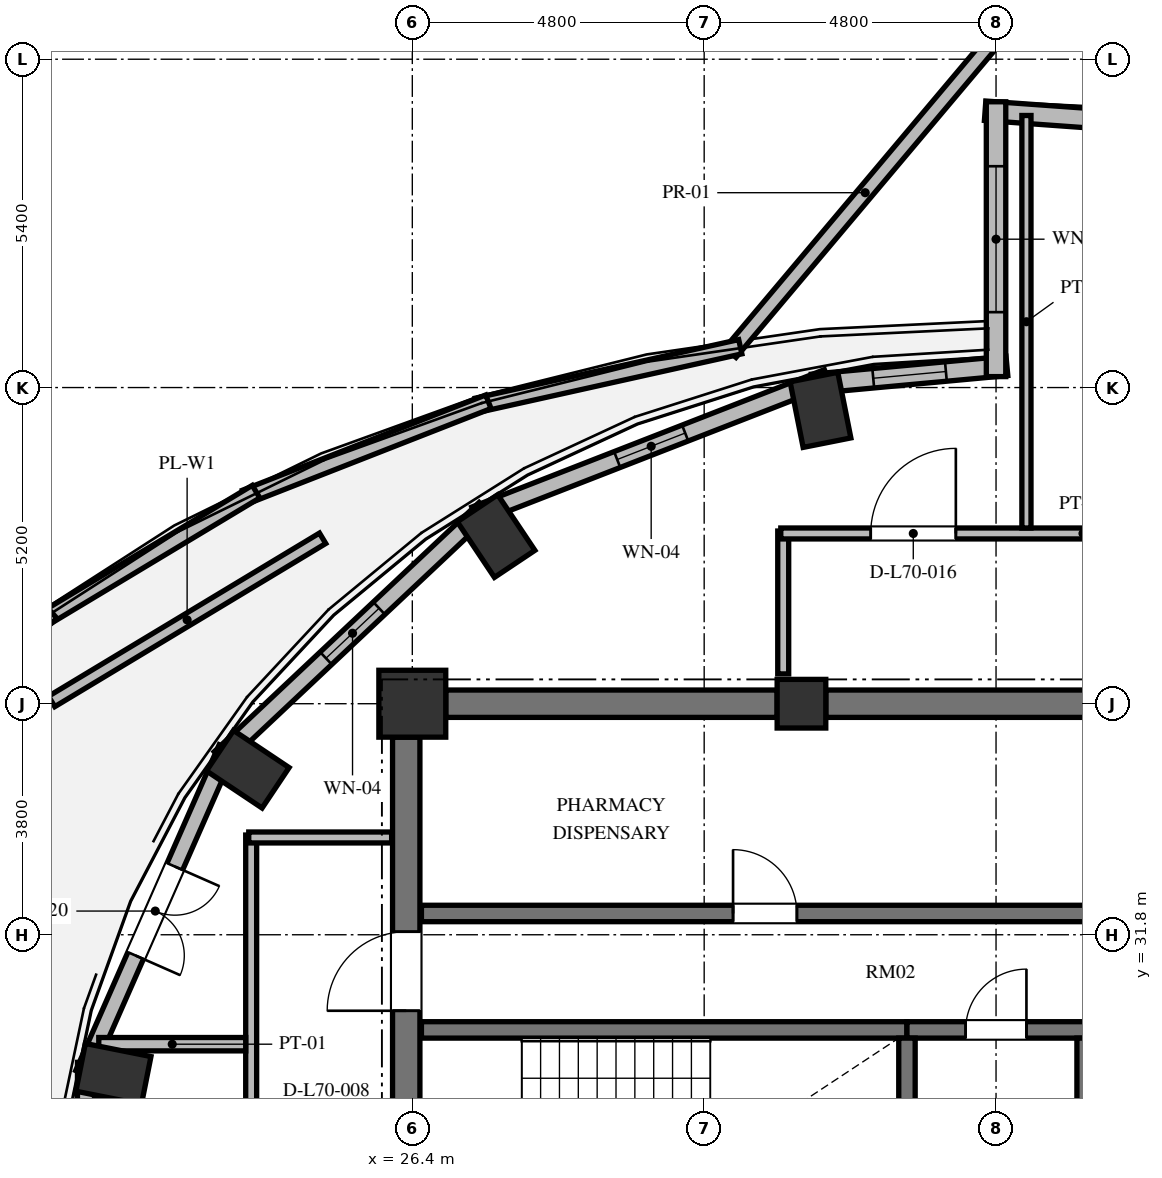
"""IFC4 building model, lengths in metres.
Left out: names, types, materials, properties, quantities, classifications, styles, units other than length and angle.
Written with IfcOpenShell. Run it as: python <this file> out.ifc"""

import sys

from ifc_helpers import new_model, si_unit, direction, frame, frame_2d, origin, origin_2d, place, context, subcontext, project, spatial, rectangle, extrude, element, fill, save


model = new_model("IFC4")
c1 = context("Model", 3, precision=1e-05, world=origin(), true_north=direction((0.0, 1.0)))
c2 = subcontext(c1, "Body", "Model", "MODEL_VIEW")
j1 = project(units=[si_unit("LENGTHUNIT", "METRE"), si_unit("PLANEANGLEUNIT", "RADIAN")], contexts=[c1])
p1 = place(None, origin())
s1 = spatial("IfcSite", under=j1, at=p1, CompositionType="ELEMENT")
p2 = place(p1, origin())
s2 = spatial("IfcBuilding", under=s1, at=p2, CompositionType="ELEMENT")
p3 = place(p2, frame((0.0, 0.0, 269.616)))
s3 = spatial("IfcBuildingStorey", under=s2, at=p3, CompositionType="ELEMENT", Elevation=269.616)
for number, where, z_axis, x_axis in (
    (1, (33.113, 40.433, 0.0), (0.0, 0.0, 1.0), (-0.195, 0.981, 0.0)),
    (2, (27.778, 38.357, 0.0), (0.0, 0.0, 1.0), (-0.556, 0.831, 0.0)),
    (3, (23.694, 34.522, 0.0), (0.0, 0.0, 1.0), (-0.831, 0.556, 0.0)),
    (4, (21.484, 29.512, 0.0), (0.0, 0.0, 1.0), (-0.981, 0.195, 0.0)),
):
    element("IfcColumn", number, at=place(p3, frame(where, z_axis=z_axis, x_axis=x_axis)), inside=s3, PredefinedType="COLUMN", context=c2, shape_type="SweptSolid", body=[
        extrude(rectangle(XDim=1.1, YDim=0.8, at=origin_2d()), origin(), (0.0, 0.0, 1.0), 3.648),
    ])
p4 = place(p3, frame((32.8, 35.6, 0.0), z_axis=(0.0, 0.0, 1.0), x_axis=(1.0, 0.0, 0.0)))
e5 = element("IfcColumn", 5, at=p4, inside=s3, PredefinedType="COLUMN", context=c2, shape_type="SweptSolid", body=[
    extrude(rectangle(XDim=0.8, YDim=0.8, at=origin_2d()), origin(), (0.0, 0.0, 1.0), 3.648),
])
p5 = place(p3, frame((26.4, 35.6, 0.0), z_axis=(0.0, 0.0, 1.0), x_axis=(1.0, 0.0, 0.0)))
e6 = element("IfcColumn", 6, at=p5, inside=s3, PredefinedType="COLUMN", context=c2, shape_type="SweptSolid", body=[
    extrude(rectangle(XDim=1.1, YDim=1.1, at=origin_2d()), origin(), (0.0, 0.0, 1.0), 3.648),
])
p6 = place(p3, frame((26.3, 20.95, 0.0), z_axis=(0.0, 0.0, 1.0), x_axis=(0.0, 1.0, 0.0)))
e7 = element("IfcWall", 7, at=p6, inside=s3, PredefinedType="SHEAR", context=c2, shape_type="SweptSolid", body=[
    extrude(rectangle(XDim=14.1, YDim=0.45, at=frame_2d((7.05, 0.0))), origin(), (0.0, 0.0, 1.0), 3.648),
])
p7 = place(p6, frame((6.5, 0.0, 0.0)))
e8 = element("IfcOpeningElement", 8, at=p7, cuts=e7, PredefinedType="OPENING", context=c2, shape_type="SweptSolid", body=[
    extrude(rectangle(XDim=1.2, YDim=2.15, at=frame_2d((0.6, 1.075))), frame((0.0, 0.235, 0.0), z_axis=(0.0, -1.0, 0.0), x_axis=(1.0, 0.0, 0.0)), (0.0, 0.0, 1.0), 0.47),
])
p8 = place(p6, frame((9.6, 0.0, 0.0)))
e9 = element("IfcOpeningElement", 9, at=p8, cuts=e7, PredefinedType="OPENING", context=c2, shape_type="SweptSolid", body=[
    extrude(rectangle(XDim=1.3, YDim=2.2, at=frame_2d((0.65, 1.1))), frame((0.0, 0.235, 0.0), z_axis=(0.0, -1.0, 0.0), x_axis=(1.0, 0.0, 0.0)), (0.0, 0.0, 1.0), 0.47),
])
p9 = place(p6, frame((3.26, 0.0, 0.0)))
e10 = element("IfcOpeningElement", 10, at=p9, cuts=e7, PredefinedType="OPENING", context=c2, shape_type="SweptSolid", body=[
    extrude(rectangle(XDim=1.3, YDim=2.2, at=frame_2d((0.65, 1.1))), frame((0.0, 0.235, 0.0), z_axis=(0.0, -1.0, 0.0), x_axis=(1.0, 0.0, 0.0)), (0.0, 0.0, 1.0), 0.47),
])
p10 = place(p3, frame((26.95, 35.6, 0.0), z_axis=(0.0, 0.0, 1.0), x_axis=(1.0, 0.0, 0.0)))
e11 = element("IfcWall", 11, at=p10, inside=s3, PredefinedType="SHEAR", context=c2, shape_type="SweptSolid", body=[
    extrude(rectangle(XDim=5.45, YDim=0.45, at=frame_2d((2.725, 0.0))), origin(), (0.0, 0.0, 1.0), 3.648),
])
p11 = place(p3, frame((33.2, 35.6, 0.0), z_axis=(0.0, 0.0, 1.0), x_axis=(1.0, 0.0, 0.0)))
e12 = element("IfcWall", 12, at=p11, inside=s3, PredefinedType="SHEAR", context=c2, shape_type="SweptSolid", body=[
    extrude(rectangle(XDim=5.6, YDim=0.45, at=frame_2d((2.8, 0.0))), origin(), (0.0, 0.0, 1.0), 3.648),
])
p12 = place(p3, frame((33.228, 40.964, 0.0), z_axis=(0.0, 0.0, 1.0), x_axis=(-0.931716550814, -0.36318627306, 0.0)))
e13 = element("IfcWall", 13, at=p12, inside=s3, PredefinedType="SOLIDWALL", context=c2, shape_type="SweptSolid", body=[
    extrude(rectangle(XDim=6.224, YDim=0.28, at=frame_2d((3.112, 0.0))), origin(), (0.0, 0.0, 1.0), 3.448),
])
p13 = place(p12, frame((2.512, 0.0, 0.85)))
e14 = element("IfcOpeningElement", 14, at=p13, cuts=e13, PredefinedType="OPENING", context=c2, shape_type="SweptSolid", body=[
    extrude(rectangle(XDim=1.2, YDim=1.8, at=frame_2d((0.6, 0.9))), frame((0.0, 0.15, 0.0), z_axis=(0.0, -1.0, 0.0), x_axis=(1.0, 0.0, 0.0)), (0.0, 0.0, 1.0), 0.3),
])
p14 = place(p3, frame((27.595, 38.808, 0.0), z_axis=(0.0, 0.0, 1.0), x_axis=(-0.728251519923, -0.685309947199, 0.0)))
e15 = element("IfcWall", 15, at=p14, inside=s3, PredefinedType="SOLIDWALL", context=c2, shape_type="SweptSolid", body=[
    extrude(rectangle(XDim=5.981, YDim=0.28, at=frame_2d((2.99, 0.0))), origin(), (0.0, 0.0, 1.0), 3.448),
])
p15 = place(p14, frame((2.391, 0.0, 0.85)))
e16 = element("IfcOpeningElement", 16, at=p15, cuts=e15, PredefinedType="OPENING", context=c2, shape_type="SweptSolid", body=[
    extrude(rectangle(XDim=1.2, YDim=1.8, at=frame_2d((0.6, 0.9))), frame((0.0, 0.15, 0.0), z_axis=(0.0, -1.0, 0.0), x_axis=(1.0, 0.0, 0.0)), (0.0, 0.0, 1.0), 0.3),
])
p16 = place(p3, frame((23.352, 34.869, 0.0), z_axis=(0.0, 0.0, 1.0), x_axis=(-0.402882523888, -0.915251698685, 0.0)))
e17 = element("IfcWall", 17, at=p16, inside=s3, PredefinedType="SOLIDWALL", context=c2, shape_type="SweptSolid", body=[
    extrude(rectangle(XDim=5.856, YDim=0.28, at=frame_2d((2.928, 0.0))), origin(), (0.0, 0.0, 1.0), 3.448),
])
p17 = place(p16, frame((2.128, 0.0, 0.0)))
e18 = element("IfcOpeningElement", 18, at=p17, cuts=e17, PredefinedType="OPENING", context=c2, shape_type="SweptSolid", body=[
    extrude(rectangle(XDim=1.6, YDim=2.3, at=frame_2d((0.8, 1.15))), frame((0.0, 0.15, 0.0), z_axis=(0.0, -1.0, 0.0), x_axis=(1.0, 0.0, 0.0)), (0.0, 0.0, 1.0), 0.3),
])
p18 = place(p3, frame((21.033, 29.701, 0.0), z_axis=(0.0, 0.0, 1.0), x_axis=(0.0, -1.0, 0.0)))
e19 = element("IfcWall", 19, at=p18, inside=s3, PredefinedType="SOLIDWALL", context=c2, shape_type="SweptSolid", body=[
    extrude(rectangle(XDim=5.803, YDim=0.28, at=frame_2d((2.901, 0.0))), origin(), (0.0, 0.0, 1.0), 3.448),
])
p19 = place(p18, frame((2.187, 0.0, 0.85)))
e20 = element("IfcOpeningElement", 20, at=p19, cuts=e19, PredefinedType="OPENING", context=c2, shape_type="SweptSolid", body=[
    extrude(rectangle(XDim=1.2, YDim=1.8, at=frame_2d((0.6, 0.9))), frame((0.0, 0.15, 0.0), z_axis=(0.0, -1.0, 0.0), x_axis=(1.0, 0.0, 0.0)), (0.0, 0.0, 1.0), 0.3),
])
p20 = place(p3, frame((40.35, 45.026, 0.0), z_axis=(0.0, 0.0, 1.0), x_axis=(-0.997412917451, 0.071885131294, 0.0)))
e21 = element("IfcWall", 21, at=p20, inside=s3, PredefinedType="SOLIDWALL", context=c2, shape_type="SweptSolid", body=[
    extrude(rectangle(XDim=4.541, YDim=0.32, at=frame_2d((2.271, 0.0))), origin(), (0.0, 0.0, 1.0), 3.448),
])
p21 = place(p20, frame((1.67, 0.0, 0.85)))
e22 = element("IfcOpeningElement", 22, at=p21, cuts=e21, PredefinedType="OPENING", context=c2, shape_type="SweptSolid", body=[
    extrude(rectangle(XDim=1.2, YDim=2.2, at=frame_2d((0.6, 1.1))), frame((0.0, 0.17, 0.0), z_axis=(0.0, -1.0, 0.0), x_axis=(1.0, 0.0, 0.0)), (0.0, 0.0, 1.0), 0.34),
])
p22 = place(p3, frame((36.179, 41.156, 0.0), z_axis=(0.0, 0.0, 1.0), x_axis=(-0.995736155144, -0.092247001792, 0.0)))
e23 = element("IfcWall", 23, at=p22, inside=s3, PredefinedType="SOLIDWALL", context=c2, shape_type="SweptSolid", body=[
    extrude(rectangle(XDim=3.216, YDim=0.32, at=frame_2d((1.608, 0.0))), origin(), (0.0, 0.0, 1.0), 3.448),
])
p23 = place(p22, frame((1.008, 0.0, 0.85)))
e24 = element("IfcOpeningElement", 24, at=p23, cuts=e23, PredefinedType="OPENING", context=c2, shape_type="SweptSolid", body=[
    extrude(rectangle(XDim=1.2, YDim=1.8, at=frame_2d((0.6, 0.9))), frame((0.0, 0.17, 0.0), z_axis=(0.0, -1.0, 0.0), x_axis=(1.0, 0.0, 0.0)), (0.0, 0.0, 1.0), 0.34),
])
p24 = place(p3, frame((36.0, 45.5, 0.0), z_axis=(0.0, 0.0, 1.0), x_axis=(0.0, -1.0, 0.0)))
e25 = element("IfcWall", 25, at=p24, inside=s3, PredefinedType="SOLIDWALL", context=c2, shape_type="SweptSolid", body=[
    extrude(rectangle(XDim=4.52, YDim=0.32, at=frame_2d((2.26, 0.0))), origin(), (0.0, 0.0, 1.0), 3.448),
])
p25 = place(p24, frame((1.06, 0.0, 0.84)))
e26 = element("IfcOpeningElement", 26, at=p25, cuts=e25, PredefinedType="OPENING", context=c2, shape_type="SweptSolid", body=[
    extrude(rectangle(XDim=2.4, YDim=2.04, at=frame_2d((1.2, 1.02))), frame((0.0, 0.17, 0.0), z_axis=(0.0, -1.0, 0.0), x_axis=(1.0, 0.0, 0.0)), (0.0, 0.0, 1.0), 0.34),
])
p26 = place(p3, frame((36.064, 46.636, 0.0), z_axis=(0.0, 0.0, 1.0), x_axis=(-0.644157596473, -0.764892797002, 0.0)))
e27 = element("IfcWall", 27, at=p26, inside=s3, PredefinedType="PARAPET", context=c2, shape_type="SweptSolid", body=[
    extrude(rectangle(XDim=6.881, YDim=0.24, at=frame_2d((3.441, 0.0))), origin(), (0.0, 0.0, 1.0), 1.2),
])
p27 = place(p3, frame((31.794, 41.471, 0.0), z_axis=(0.0, 0.0, 1.0), x_axis=(-0.97619223607, -0.216907165018, 0.0)))
e28 = element("IfcWall", 28, at=p27, inside=s3, PredefinedType="PARAPET", context=c2, shape_type="SweptSolid", body=[
    extrude(rectangle(XDim=4.439, YDim=0.24, at=frame_2d((2.22, 0.0))), origin(), (0.0, 0.0, 1.0), 1.2),
])
p28 = place(p3, frame((27.651, 40.566, 0.0), z_axis=(0.0, 0.0, 1.0), x_axis=(-0.931156390878, -0.364620042958, 0.0)))
e29 = element("IfcWall", 29, at=p28, inside=s3, PredefinedType="PARAPET", context=c2, shape_type="SweptSolid", body=[
    extrude(rectangle(XDim=4.296, YDim=0.24, at=frame_2d((2.148, 0.0))), origin(), (0.0, 0.0, 1.0), 1.2),
])
p29 = place(p3, frame((23.83, 39.088, 0.0), z_axis=(0.0, 0.0, 1.0), x_axis=(-0.857072360175, -0.515196049503, 0.0)))
e30 = element("IfcWall", 30, at=p29, inside=s3, PredefinedType="PARAPET", context=c2, shape_type="SweptSolid", body=[
    extrude(rectangle(XDim=4.101, YDim=0.24, at=frame_2d((2.05, 0.0))), origin(), (0.0, 0.0, 1.0), 1.2),
])
p30 = place(p3, frame((20.476, 37.094, 0.0), z_axis=(0.0, 0.0, 1.0), x_axis=(-0.746018095031, -0.665925672944, 0.0)))
e31 = element("IfcWall", 31, at=p30, inside=s3, PredefinedType="PARAPET", context=c2, shape_type="SweptSolid", body=[
    extrude(rectangle(XDim=3.877, YDim=0.24, at=frame_2d((1.939, 0.0))), origin(), (0.0, 0.0, 1.0), 1.2),
])
p31 = place(p3, frame((24.925, 38.321, 0.0), z_axis=(0.0, 0.0, 1.0), x_axis=(-0.856651190981, -0.515896052506, 0.0)))
e32 = element("IfcWall", 32, at=p31, inside=s3, PredefinedType="PARAPET", context=c2, shape_type="SweptSolid", body=[
    extrude(rectangle(XDim=5.202, YDim=0.2, at=frame_2d((2.601, 0.0))), origin(), (0.0, 0.0, 1.0), 0.55),
])
p32 = place(p3, frame((26.55, 30.235, 0.0), z_axis=(0.0, 0.0, 1.0), x_axis=(1.0, 0.0, 0.0)))
e33 = element("IfcWall", 33, at=p32, inside=s3, PredefinedType="SHEAR", context=c2, shape_type="SweptSolid", body=[
    extrude(rectangle(XDim=7.985, YDim=0.27, at=frame_2d((3.992, 0.0))), origin(), (0.0, 0.0, 1.0), 3.648),
])
p33 = place(p3, frame((34.535, 30.235, 0.0), z_axis=(0.0, 0.0, 1.0), x_axis=(1.0, 0.0, 0.0)))
e34 = element("IfcWall", 34, at=p33, inside=s3, PredefinedType="SHEAR", context=c2, shape_type="SweptSolid", body=[
    extrude(rectangle(XDim=2.93, YDim=0.27, at=frame_2d((1.465, 0.0))), origin(), (0.0, 0.0, 1.0), 3.648),
])
p34 = place(p33, frame((0.965, 0.0, 0.0)))
e35 = element("IfcOpeningElement", 35, at=p34, cuts=e34, PredefinedType="OPENING", context=c2, shape_type="SweptSolid", body=[
    extrude(rectangle(XDim=1.0, YDim=2.1, at=frame_2d((0.5, 1.05))), frame((0.0, 0.145, 0.0), z_axis=(0.0, -1.0, 0.0), x_axis=(1.0, 0.0, 0.0)), (0.0, 0.0, 1.0), 0.29),
])
for number, where, z_axis, x_axis in (
    (36, (34.535, 26.02, 0.0), (0.0, 0.0, 1.0), (0.0, 1.0, 0.0)),
    (37, (37.465, 26.02, 0.0), (0.0, 0.0, 1.0), (0.0, 1.0, 0.0)),
):
    element("IfcWall", number, at=place(p3, frame(where, z_axis=z_axis, x_axis=x_axis)), inside=s3, PredefinedType="SHEAR", context=c2, shape_type="SweptSolid", body=[
        extrude(rectangle(XDim=4.08, YDim=0.27, at=frame_2d((2.04, 0.0))), origin(), (0.0, 0.0, 1.0), 3.648),
    ])
p35 = place(p3, frame((26.55, 32.15, 0.0), z_axis=(0.0, 0.0, 1.0), x_axis=(1.0, 0.0, 0.0)))
e38 = element("IfcWall", 38, at=p35, inside=s3, PredefinedType="SHEAR", context=c2, shape_type="SweptSolid", body=[
    extrude(rectangle(XDim=16.4, YDim=0.27, at=frame_2d((8.2, 0.0))), origin(), (0.0, 0.0, 1.0), 3.648),
])
p36 = place(p35, frame((5.125, 0.0, 0.0)))
e39 = element("IfcOpeningElement", 39, at=p36, cuts=e38, PredefinedType="OPENING", context=c2, shape_type="SweptSolid", body=[
    extrude(rectangle(XDim=1.05, YDim=2.15, at=frame_2d((0.525, 1.075))), frame((0.0, 0.145, 0.0), z_axis=(0.0, -1.0, 0.0), x_axis=(1.0, 0.0, 0.0)), (0.0, 0.0, 1.0), 0.29),
])
p37 = place(p35, frame((11.9, 0.0, 0.0)))
e40 = element("IfcOpeningElement", 40, at=p37, cuts=e38, PredefinedType="OPENING", context=c2, shape_type="SweptSolid", body=[
    extrude(rectangle(XDim=1.1, YDim=2.2, at=frame_2d((0.55, 1.1))), frame((0.0, 0.145, 0.0), z_axis=(0.0, -1.0, 0.0), x_axis=(1.0, 0.0, 0.0)), (0.0, 0.0, 1.0), 0.29),
])
p38 = place(p35, frame((14.5, 0.0, 0.0)))
e41 = element("IfcOpeningElement", 41, at=p38, cuts=e38, PredefinedType="OPENING", context=c2, shape_type="SweptSolid", body=[
    extrude(rectangle(XDim=1.1, YDim=2.2, at=frame_2d((0.55, 1.1))), frame((0.0, 0.145, 0.0), z_axis=(0.0, -1.0, 0.0), x_axis=(1.0, 0.0, 0.0)), (0.0, 0.0, 1.0), 0.29),
])
p39 = place(p3, frame((32.5, 36.09, 0.0), z_axis=(0.0, 0.0, 1.0), x_axis=(0.0, 1.0, 0.0)))
e42 = element("IfcWall", 42, at=p39, inside=s3, PredefinedType="PARTITIONING", context=c2, shape_type="SweptSolid", body=[
    extrude(rectangle(XDim=2.35, YDim=0.18, at=frame_2d((1.175, 0.0))), origin(), (0.0, 0.0, 1.0), 3.448),
])
p40 = place(p3, frame((32.46, 38.4, 0.0), z_axis=(0.0, 0.0, 1.0), x_axis=(1.0, 0.0, 0.0)))
e43 = element("IfcWall", 43, at=p40, inside=s3, PredefinedType="PARTITIONING", context=c2, shape_type="SweptSolid", body=[
    extrude(rectangle(XDim=19.879, YDim=0.18, at=frame_2d((9.939, 0.0))), origin(), (0.0, 0.0, 1.0), 3.073),
])
p41 = place(p40, frame((16.101, 0.0, 0.0)))
e44 = element("IfcOpeningElement", 44, at=p41, cuts=e43, PredefinedType="OPENING", context=c2, shape_type="SweptSolid", body=[
    extrude(rectangle(XDim=1.4, YDim=2.2, at=frame_2d((0.7, 1.1))), frame((0.0, 0.1, 0.0), z_axis=(0.0, -1.0, 0.0), x_axis=(1.0, 0.0, 0.0)), (0.0, 0.0, 1.0), 0.2),
])
p42 = place(p40, frame((10.84, 0.0, 0.0)))
e45 = element("IfcOpeningElement", 45, at=p42, cuts=e43, PredefinedType="OPENING", context=c2, shape_type="SweptSolid", body=[
    extrude(rectangle(XDim=1.4, YDim=2.2, at=frame_2d((0.7, 1.1))), frame((0.0, 0.1, 0.0), z_axis=(0.0, -1.0, 0.0), x_axis=(1.0, 0.0, 0.0)), (0.0, 0.0, 1.0), 0.2),
])
p43 = place(p40, frame((5.84, 0.0, 0.0)))
e46 = element("IfcOpeningElement", 46, at=p43, cuts=e43, PredefinedType="OPENING", context=c2, shape_type="SweptSolid", body=[
    extrude(rectangle(XDim=1.4, YDim=2.2, at=frame_2d((0.7, 1.1))), frame((0.0, 0.1, 0.0), z_axis=(0.0, -1.0, 0.0), x_axis=(1.0, 0.0, 0.0)), (0.0, 0.0, 1.0), 0.2),
])
p44 = place(p40, frame((1.479, 0.0, 0.0)))
e47 = element("IfcOpeningElement", 47, at=p44, cuts=e43, PredefinedType="OPENING", context=c2, shape_type="SweptSolid", body=[
    extrude(rectangle(XDim=1.4, YDim=2.2, at=frame_2d((0.7, 1.1))), frame((0.0, 0.1, 0.0), z_axis=(0.0, -1.0, 0.0), x_axis=(1.0, 0.0, 0.0)), (0.0, 0.0, 1.0), 0.2),
])
p45 = place(p3, frame((23.75, 22.16, 0.0), z_axis=(0.0, 0.0, 1.0), x_axis=(0.0, 1.0, 0.0)))
e48 = element("IfcWall", 48, at=p45, inside=s3, PredefinedType="PARTITIONING", context=c2, shape_type="SweptSolid", body=[
    extrude(rectangle(XDim=11.28, YDim=0.18, at=frame_2d((5.64, 0.0))), origin(), (0.0, 0.0, 1.0), 3.448),
])
p46 = place(p45, frame((5.123, 0.0, 0.0)))
e49 = element("IfcOpeningElement", 49, at=p46, cuts=e48, PredefinedType="OPENING", context=c2, shape_type="SweptSolid", body=[
    extrude(rectangle(XDim=1.4, YDim=2.2, at=frame_2d((0.7, 1.1))), frame((0.0, 0.1, 0.0), z_axis=(0.0, -1.0, 0.0), x_axis=(1.0, 0.0, 0.0)), (0.0, 0.0, 1.0), 0.2),
])
p47 = place(p45, frame((1.379, 0.0, 0.0)))
e50 = element("IfcOpeningElement", 50, at=p47, cuts=e48, PredefinedType="OPENING", context=c2, shape_type="SweptSolid", body=[
    extrude(rectangle(XDim=1.4, YDim=2.2, at=frame_2d((0.7, 1.1))), frame((0.0, 0.1, 0.0), z_axis=(0.0, -1.0, 0.0), x_axis=(1.0, 0.0, 0.0)), (0.0, 0.0, 1.0), 0.2),
])
p48 = place(p3, frame((23.71, 33.4, 0.0), z_axis=(0.0, 0.0, 1.0), x_axis=(1.0, 0.0, 0.0)))
e51 = element("IfcWall", 51, at=p48, inside=s3, PredefinedType="PARTITIONING", context=c2, shape_type="SweptSolid", body=[
    extrude(rectangle(XDim=2.35, YDim=0.18, at=frame_2d((1.175, 0.0))), origin(), (0.0, 0.0, 1.0), 3.448),
])
p49 = place(p3, frame((21.244, 30.0, 0.0), z_axis=(0.0, 0.0, 1.0), x_axis=(1.0, 0.0, 0.0)))
e52 = element("IfcWall", 52, at=p49, inside=s3, PredefinedType="PARTITIONING", context=c2, shape_type="SweptSolid", body=[
    extrude(rectangle(XDim=2.416, YDim=0.22, at=frame_2d((1.208, 0.0))), origin(), (0.0, 0.0, 1.0), 3.448),
])
p50 = place(p3, frame((36.5, 38.49, 0.0), z_axis=(0.0, 0.0, 1.0), x_axis=(0.0, 1.0, 0.0)))
e53 = element("IfcWall", 53, at=p50, inside=s3, PredefinedType="PARTITIONING", context=c2, shape_type="SweptSolid", body=[
    extrude(rectangle(XDim=6.785, YDim=0.15, at=frame_2d((3.392, 0.0))), origin(), (0.0, 0.0, 1.0), 3.448),
])
p51 = place(p13, origin())
e54 = element("IfcWindow", 54, at=p51, inside=s3, PartitioningType="SINGLE_PANEL", PredefinedType="WINDOW", context=c2, shape_type="SweptSolid", body=[
    extrude(rectangle(XDim=1.2, YDim=1.8, at=frame_2d((0.6, 0.9))), frame((0.0, 0.03, 0.0), z_axis=(0.0, -1.0, 0.0), x_axis=(1.0, 0.0, 0.0)), (0.0, 0.0, 1.0), 0.06),
])
fill(e14, e54)
p52 = place(p15, origin())
e55 = element("IfcWindow", 55, at=p52, inside=s3, PartitioningType="SINGLE_PANEL", PredefinedType="WINDOW", context=c2, shape_type="SweptSolid", body=[
    extrude(rectangle(XDim=1.2, YDim=1.8, at=frame_2d((0.6, 0.9))), frame((0.0, 0.03, 0.0), z_axis=(0.0, -1.0, 0.0), x_axis=(1.0, 0.0, 0.0)), (0.0, 0.0, 1.0), 0.06),
])
fill(e16, e55)
p53 = place(p17, origin())
e56 = element("IfcDoor", 56, at=p53, inside=s3, OperationType="DOUBLE_DOOR_SINGLE_SWING", PredefinedType="DOOR", context=c2, shape_type="SweptSolid", body=[
    extrude(rectangle(XDim=1.6, YDim=2.3, at=frame_2d((0.8, 1.15))), frame((0.0, 0.025, 0.0), z_axis=(0.0, -1.0, 0.0), x_axis=(1.0, 0.0, 0.0)), (0.0, 0.0, 1.0), 0.05),
])
fill(e18, e56)
p54 = place(p23, origin())
e57 = element("IfcWindow", 57, at=p54, inside=s3, PartitioningType="SINGLE_PANEL", PredefinedType="WINDOW", context=c2, shape_type="SweptSolid", body=[
    extrude(rectangle(XDim=1.2, YDim=1.8, at=frame_2d((0.6, 0.9))), frame((0.0, 0.03, 0.0), z_axis=(0.0, -1.0, 0.0), x_axis=(1.0, 0.0, 0.0)), (0.0, 0.0, 1.0), 0.06),
])
fill(e24, e57)
p55 = place(p25, origin())
e58 = element("IfcWindow", 58, at=p55, inside=s3, PartitioningType="SINGLE_PANEL", PredefinedType="WINDOW", context=c2, shape_type="SweptSolid", body=[
    extrude(rectangle(XDim=2.4, YDim=2.04, at=frame_2d((1.2, 1.02))), frame((0.0, 0.03, 0.0), z_axis=(0.0, -1.0, 0.0), x_axis=(1.0, 0.0, 0.0)), (0.0, 0.0, 1.0), 0.06),
])
fill(e26, e58)
p56 = place(p34, origin())
e59 = element("IfcDoor", 59, at=p56, inside=s3, OperationType="SINGLE_SWING_RIGHT", PredefinedType="DOOR", context=c2, shape_type="SweptSolid", body=[
    extrude(rectangle(XDim=1.0, YDim=2.1, at=frame_2d((0.5, 1.05))), frame((0.0, 0.025, 0.0), z_axis=(0.0, -1.0, 0.0), x_axis=(1.0, 0.0, 0.0)), (0.0, 0.0, 1.0), 0.05),
])
fill(e35, e59)
p57 = place(p8, origin())
e60 = element("IfcDoor", 60, at=p57, inside=s3, OperationType="SINGLE_SWING_LEFT", PredefinedType="DOOR", context=c2, shape_type="SweptSolid", body=[
    extrude(rectangle(XDim=1.3, YDim=2.2, at=frame_2d((0.65, 1.1))), frame((0.0, 0.025, 0.0), z_axis=(0.0, -1.0, 0.0), x_axis=(1.0, 0.0, 0.0)), (0.0, 0.0, 1.0), 0.05),
])
fill(e9, e60)
p58 = place(p36, origin())
e61 = element("IfcDoor", 61, at=p58, inside=s3, OperationType="SINGLE_SWING_LEFT", PredefinedType="DOOR", context=c2, shape_type="SweptSolid", body=[
    extrude(rectangle(XDim=1.05, YDim=2.15, at=frame_2d((0.525, 1.075))), frame((0.0, 0.025, 0.0), z_axis=(0.0, -1.0, 0.0), x_axis=(1.0, 0.0, 0.0)), (0.0, 0.0, 1.0), 0.05),
])
fill(e39, e61)
p59 = place(p44, origin())
e62 = element("IfcDoor", 62, at=p59, inside=s3, OperationType="SINGLE_SWING_RIGHT", PredefinedType="DOOR", context=c2, shape_type="SweptSolid", body=[
    extrude(rectangle(XDim=1.4, YDim=2.2, at=frame_2d((0.7, 1.1))), frame((0.0, 0.025, 0.0), z_axis=(0.0, -1.0, 0.0), x_axis=(1.0, 0.0, 0.0)), (0.0, 0.0, 1.0), 0.05),
])
fill(e47, e62)
save(model, sys.argv[1])
